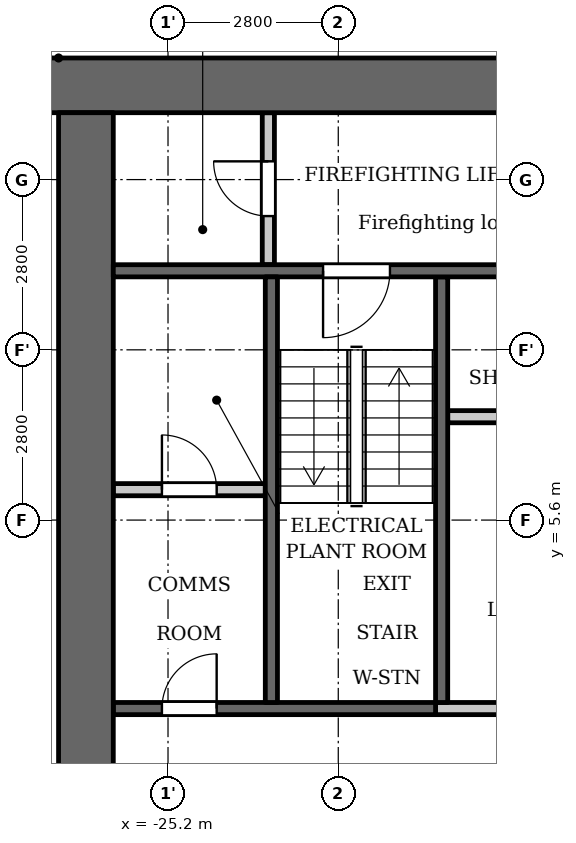
"""IFC4 building model, lengths in metres.
Left out: names, types, materials, properties, quantities, classifications, styles, units other than length and angle.
Written with IfcOpenShell. Run it as: python <this file> out.ifc"""

import sys

from ifc_helpers import new_model, si_unit, direction, frame, frame_2d, origin, place, context, subcontext, project, spatial, rectangle, extrude, element, fill, save


model = new_model("IFC4")
c1 = context("Model", 3, precision=1e-05, world=origin(), true_north=direction((0.0, 1.0)))
c2 = subcontext(c1, "Body", "Model", "MODEL_VIEW")
j1 = project(units=[si_unit("LENGTHUNIT", "METRE"), si_unit("PLANEANGLEUNIT", "RADIAN")], contexts=[c1])
p1 = place(None, origin())
s1 = spatial("IfcSite", under=j1, at=p1, CompositionType="ELEMENT")
p2 = place(p1, origin())
s2 = spatial("IfcBuilding", under=s1, at=p2, CompositionType="ELEMENT")
p3 = place(p2, frame((0.0, 0.0, 58.5)))
s3 = spatial("IfcBuildingStorey", under=s2, at=p3, CompositionType="ELEMENT", Elevation=58.5)
p4 = place(p3, frame((-20.7, 2.6, 0.0), z_axis=(0.0, 0.0, 1.0), x_axis=(0.0, 1.0, 0.0)))
e1 = element("IfcWall", 1, at=p4, inside=s3, PredefinedType="SHEAR", context=c2, shape_type="SweptSolid", body=[
    extrude(rectangle(XDim=7.0, YDim=0.2, at=frame_2d((3.5, 0.0))), origin(), (0.0, 0.0, 1.0), 3.2),
])
p5 = place(p3, frame((-20.8, 2.5, 0.0), z_axis=(0.0, 0.0, 1.0), x_axis=(-1.0, 0.0, 0.0)))
e2 = element("IfcWall", 2, at=p5, inside=s3, PredefinedType="SHEAR", context=c2, shape_type="SweptSolid", body=[
    extrude(rectangle(XDim=5.3, YDim=0.2, at=frame_2d((2.65, 0.0))), origin(), (0.0, 0.0, 1.0), 3.2),
])
p6 = place(p5, frame((3.6, 0.0, 0.0)))
e3 = element("IfcOpeningElement", 3, at=p6, cuts=e2, PredefinedType="OPENING", context=c2, shape_type="SweptSolid", body=[
    extrude(rectangle(XDim=0.9, YDim=2.1, at=frame_2d((0.45, 1.05))), frame((0.0, 0.11, 0.0), z_axis=(0.0, -1.0, 0.0), x_axis=(1.0, 0.0, 0.0)), (0.0, 0.0, 1.0), 0.22),
])
p7 = place(p3, frame((-17.4, 12.75, 0.0), z_axis=(0.0, 0.0, 1.0), x_axis=(-1.0, 0.0, 0.0)))
e4 = element("IfcWall", 4, at=p7, inside=s3, PredefinedType="SHEAR", context=c2, shape_type="SweptSolid", body=[
    extrude(rectangle(XDim=10.4, YDim=0.9, at=frame_2d((5.2, 0.0))), origin(), (0.0, 0.0, 1.0), 3.2),
])
p8 = place(p3, frame((-26.55, -12.3, 0.0), z_axis=(0.0, 0.0, 1.0), x_axis=(0.0, 1.0, 0.0)))
e5 = element("IfcWall", 5, at=p8, inside=s3, PredefinedType="SHEAR", context=c2, shape_type="SweptSolid", body=[
    extrude(rectangle(XDim=24.6, YDim=0.9, at=frame_2d((12.3, 0.0))), origin(), (0.0, 0.0, 1.0), 3.2),
])
p9 = place(p3, frame((-23.55, 9.8, 0.0), z_axis=(0.0, 0.0, 1.0), x_axis=(0.0, 1.0, 0.0)))
e6 = element("IfcWall", 6, at=p9, inside=s3, PredefinedType="PARTITIONING", context=c2, shape_type="SweptSolid", body=[
    extrude(rectangle(XDim=2.5, YDim=0.2, at=frame_2d((1.25, 0.0))), origin(), (0.0, 0.0, 1.0), 3.2),
])
p10 = place(p9, frame((0.8, 0.0, 0.0)))
e7 = element("IfcOpeningElement", 7, at=p10, cuts=e6, PredefinedType="OPENING", context=c2, shape_type="SweptSolid", body=[
    extrude(rectangle(XDim=0.9, YDim=2.1, at=frame_2d((0.45, 1.05))), frame((0.0, 0.11, 0.0), z_axis=(0.0, -1.0, 0.0), x_axis=(1.0, 0.0, 0.0)), (0.0, 0.0, 1.0), 0.22),
])
p11 = place(p3, frame((-23.6, 6.1, 0.0), z_axis=(0.0, 0.0, 1.0), x_axis=(-1.0, 0.0, 0.0)))
e8 = element("IfcWall", 8, at=p11, inside=s3, PredefinedType="PARTITIONING", context=c2, shape_type="SweptSolid", body=[
    extrude(rectangle(XDim=2.5, YDim=0.2, at=frame_2d((1.25, 0.0))), origin(), (0.0, 0.0, 1.0), 3.2),
])
p12 = place(p11, frame((0.8, 0.0, 0.0)))
e9 = element("IfcOpeningElement", 9, at=p12, cuts=e8, PredefinedType="OPENING", context=c2, shape_type="SweptSolid", body=[
    extrude(rectangle(XDim=0.9, YDim=2.1, at=frame_2d((0.45, 1.05))), frame((0.0, 0.11, 0.0), z_axis=(0.0, -1.0, 0.0), x_axis=(1.0, 0.0, 0.0)), (0.0, 0.0, 1.0), 0.22),
])
p13 = place(p3, frame((-17.8, 2.5, 0.0), z_axis=(0.0, 0.0, 1.0), x_axis=(-1.0, 0.0, 0.0)))
e10 = element("IfcWall", 10, at=p13, inside=s3, PredefinedType="PARTITIONING", context=c2, shape_type="SweptSolid", body=[
    extrude(rectangle(XDim=3.0, YDim=0.2, at=frame_2d((1.5, 0.0))), origin(), (0.0, 0.0, 1.0), 3.2),
])
p14 = place(p3, frame((-17.8, 7.3, 0.0), z_axis=(0.0, 0.0, 1.0), x_axis=(-1.0, 0.0, 0.0)))
e11 = element("IfcWall", 11, at=p14, inside=s3, PredefinedType="PARTITIONING", context=c2, shape_type="SweptSolid", body=[
    extrude(rectangle(XDim=2.8, YDim=0.2, at=frame_2d((1.4, 0.0))), origin(), (0.0, 0.0, 1.0), 3.2),
])
p15 = place(p3, frame((-17.8, 9.7, 0.0), z_axis=(0.0, 0.0, 1.0), x_axis=(-1.0, 0.0, 0.0)))
e12 = element("IfcWall", 12, at=p15, inside=s3, PredefinedType="SHEAR", context=c2, shape_type="SweptSolid", body=[
    extrude(rectangle(XDim=8.3, YDim=0.2, at=frame_2d((4.15, 0.0))), origin(), (0.0, 0.0, 1.0), 3.2),
])
p16 = place(p15, frame((0.85, 0.0, 0.0)))
e13 = element("IfcOpeningElement", 13, at=p16, cuts=e12, PredefinedType="OPENING", context=c2, shape_type="SweptSolid", body=[
    extrude(rectangle(XDim=1.1, YDim=2.1, at=frame_2d((0.55, 1.05))), frame((0.0, 0.11, 0.0), z_axis=(0.0, -1.0, 0.0), x_axis=(1.0, 0.0, 0.0)), (0.0, 0.0, 1.0), 0.22),
])
p17 = place(p15, frame((3.75, 0.0, 0.0)))
e14 = element("IfcOpeningElement", 14, at=p17, cuts=e12, PredefinedType="OPENING", context=c2, shape_type="SweptSolid", body=[
    extrude(rectangle(XDim=1.1, YDim=2.1, at=frame_2d((0.55, 1.05))), frame((0.0, 0.11, 0.0), z_axis=(0.0, -1.0, 0.0), x_axis=(1.0, 0.0, 0.0)), (0.0, 0.0, 1.0), 0.22),
])
p18 = place(p3, frame((-23.5, 2.6, 0.0), z_axis=(0.0, 0.0, 1.0), x_axis=(0.0, 1.0, 0.0)))
e15 = element("IfcWall", 15, at=p18, inside=s3, PredefinedType="SHEAR", context=c2, shape_type="SweptSolid", body=[
    extrude(rectangle(XDim=7.0, YDim=0.2, at=frame_2d((3.5, 0.0))), origin(), (0.0, 0.0, 1.0), 3.2),
])
p19 = place(p10, origin())
e16 = element("IfcDoor", 16, at=p19, inside=s3, OperationType="SINGLE_SWING_LEFT", PredefinedType="DOOR", context=c2, shape_type="SweptSolid", body=[
    extrude(rectangle(XDim=0.9, YDim=2.1, at=frame_2d((0.45, 1.05))), frame((0.0, 0.025, 0.0), z_axis=(0.0, -1.0, 0.0), x_axis=(1.0, 0.0, 0.0)), (0.0, 0.0, 1.0), 0.05),
])
fill(e7, e16)
p20 = place(p17, origin())
e17 = element("IfcDoor", 17, at=p20, inside=s3, OperationType="SINGLE_SWING_LEFT", PredefinedType="DOOR", context=c2, shape_type="SweptSolid", body=[
    extrude(rectangle(XDim=1.1, YDim=2.1, at=frame_2d((0.55, 1.05))), frame((0.0, 0.025, 0.0), z_axis=(0.0, -1.0, 0.0), x_axis=(1.0, 0.0, 0.0)), (0.0, 0.0, 1.0), 0.05),
])
fill(e14, e17)
p21 = place(p12, origin())
e18 = element("IfcDoor", 18, at=p21, inside=s3, OperationType="SINGLE_SWING_RIGHT", PredefinedType="DOOR", context=c2, shape_type="SweptSolid", body=[
    extrude(rectangle(XDim=0.9, YDim=2.1, at=frame_2d((0.45, 1.05))), frame((0.0, 0.025, 0.0), z_axis=(0.0, -1.0, 0.0), x_axis=(1.0, 0.0, 0.0)), (0.0, 0.0, 1.0), 0.05),
])
fill(e9, e18)
p22 = place(p6, origin())
e19 = element("IfcDoor", 19, at=p22, inside=s3, OperationType="SINGLE_SWING_LEFT", PredefinedType="DOOR", context=c2, shape_type="SweptSolid", body=[
    extrude(rectangle(XDim=0.9, YDim=2.1, at=frame_2d((0.45, 1.05))), frame((0.0, 0.025, 0.0), z_axis=(0.0, -1.0, 0.0), x_axis=(1.0, 0.0, 0.0)), (0.0, 0.0, 1.0), 0.05),
])
fill(e3, e19)
save(model, sys.argv[1])
